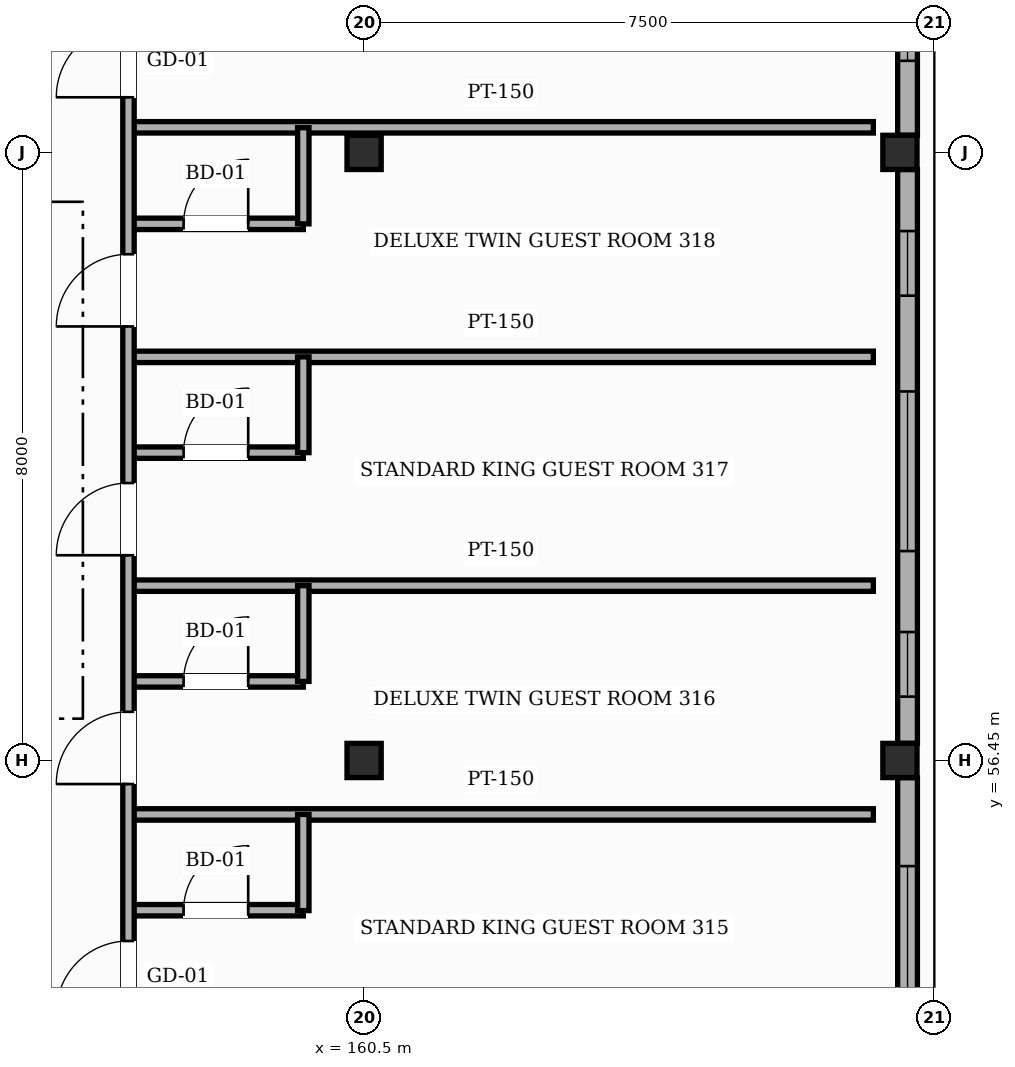
"""IFC4 building model, lengths in metres.
Left out: names, types, materials, properties, quantities, classifications, styles, units other than length and angle.
Written with IfcOpenShell. Run it as: python <this file> out.ifc"""

import sys

from ifc_helpers import new_model, si_unit, direction, frame, frame_2d, origin, origin_2d, place, context, subcontext, project, spatial, rectangle, hollow_rectangle, extrude, element, fill, save


model = new_model("IFC4")
c1 = context("Model", 3, precision=1e-05, world=origin(), true_north=direction((0.0, 1.0)))
c2 = subcontext(c1, "Body", "Model", "MODEL_VIEW")
j1 = project(units=[si_unit("LENGTHUNIT", "METRE"), si_unit("PLANEANGLEUNIT", "RADIAN")], contexts=[c1])
p1 = place(None, origin())
s1 = spatial("IfcSite", under=j1, at=p1, CompositionType="ELEMENT")
p2 = place(p1, origin())
s2 = spatial("IfcBuilding", under=s1, at=p2, CompositionType="ELEMENT")
p3 = place(p2, frame((0.0, 0.0, 42.6)))
s3 = spatial("IfcBuildingStorey", under=s2, at=p3, CompositionType="ELEMENT", Elevation=42.6)
for number, where, z_axis, x_axis in (
    (1, (160.5, 56.45, 0.0), (0.0, 0.0, 1.0), (1.0, 0.0, 0.0)),
    (2, (160.5, 64.45, 0.0), (0.0, 0.0, 1.0), (1.0, 0.0, 0.0)),
    (3, (167.55, 56.45, 0.0), (0.0, 0.0, 1.0), (1.0, 0.0, 0.0)),
    (4, (167.55, 64.45, 0.0), (0.0, 0.0, 1.0), (1.0, 0.0, 0.0)),
):
    element("IfcColumn", number, at=place(p3, frame(where, z_axis=z_axis, x_axis=x_axis)), inside=s3, PredefinedType="COLUMN", context=c2, shape_type="SweptSolid", body=[
        extrude(hollow_rectangle(XDim=0.45, YDim=0.45, WallThickness=0.019, InnerFilletRadius=0.019, OuterFilletRadius=0.038, at=origin_2d()), origin(), (0.0, 0.0, 1.0), 3.6),
    ])
p4 = place(p3, frame((167.65, 56.225, 0.0), z_axis=(0.0, 0.0, 1.0), x_axis=(0.0, -1.0, 0.0)))
e5 = element("IfcWall", 5, at=p4, inside=s3, PredefinedType="SOLIDWALL", context=c2, shape_type="SweptSolid", body=[
    extrude(rectangle(XDim=7.55, YDim=0.26, at=frame_2d((3.775, 0.0))), origin(), (0.0, 0.0, 1.0), 2.755),
])
p5 = place(p4, frame((4.285, 0.0, 0.85)))
e6 = element("IfcOpeningElement", 6, at=p5, cuts=e5, PredefinedType="OPENING", context=c2, shape_type="SweptSolid", body=[
    extrude(rectangle(XDim=1.45, YDim=1.35, at=frame_2d((0.725, 0.675))), frame((0.0, 0.14, 0.0), z_axis=(0.0, -1.0, 0.0), x_axis=(1.0, 0.0, 0.0)), (0.0, 0.0, 1.0), 0.28),
])
p6 = place(p4, frame((1.165, 0.0, 0.85)))
e7 = element("IfcOpeningElement", 7, at=p6, cuts=e5, PredefinedType="OPENING", context=c2, shape_type="SweptSolid", body=[
    extrude(rectangle(XDim=1.65, YDim=1.35, at=frame_2d((0.825, 0.675))), frame((0.0, 0.14, 0.0), z_axis=(0.0, -1.0, 0.0), x_axis=(1.0, 0.0, 0.0)), (0.0, 0.0, 1.0), 0.28),
])
p7 = place(p3, frame((167.65, 64.225, 0.0), z_axis=(0.0, 0.0, 1.0), x_axis=(0.0, -1.0, 0.0)))
e8 = element("IfcWall", 8, at=p7, inside=s3, PredefinedType="SOLIDWALL", context=c2, shape_type="SweptSolid", body=[
    extrude(rectangle(XDim=7.55, YDim=0.26, at=frame_2d((3.775, 0.0))), origin(), (0.0, 0.0, 1.0), 2.755),
])
p8 = place(p7, frame((6.085, 0.0, 0.85)))
e9 = element("IfcOpeningElement", 9, at=p8, cuts=e8, PredefinedType="OPENING", context=c2, shape_type="SweptSolid", body=[
    extrude(rectangle(XDim=0.85, YDim=1.35, at=frame_2d((0.425, 0.675))), frame((0.0, 0.14, 0.0), z_axis=(0.0, -1.0, 0.0), x_axis=(1.0, 0.0, 0.0)), (0.0, 0.0, 1.0), 0.28),
])
p9 = place(p7, frame((2.92, 0.0, 0.85)))
e10 = element("IfcOpeningElement", 10, at=p9, cuts=e8, PredefinedType="OPENING", context=c2, shape_type="SweptSolid", body=[
    extrude(rectangle(XDim=2.1, YDim=1.35, at=frame_2d((1.05, 0.675))), frame((0.0, 0.14, 0.0), z_axis=(0.0, -1.0, 0.0), x_axis=(1.0, 0.0, 0.0)), (0.0, 0.0, 1.0), 0.28),
])
p10 = place(p7, frame((0.81, 0.0, 0.85)))
e11 = element("IfcOpeningElement", 11, at=p10, cuts=e8, PredefinedType="OPENING", context=c2, shape_type="SweptSolid", body=[
    extrude(rectangle(XDim=0.85, YDim=1.35, at=frame_2d((0.425, 0.675))), frame((0.0, 0.14, 0.0), z_axis=(0.0, -1.0, 0.0), x_axis=(1.0, 0.0, 0.0)), (0.0, 0.0, 1.0), 0.28),
])
p11 = place(p3, frame((167.65, 70.8, 0.0), z_axis=(0.0, 0.0, 1.0), x_axis=(0.0, -1.0, 0.0)))
e12 = element("IfcWall", 12, at=p11, inside=s3, PredefinedType="SOLIDWALL", context=c2, shape_type="SweptSolid", body=[
    extrude(rectangle(XDim=6.125, YDim=0.26, at=frame_2d((3.062, 0.0))), origin(), (0.0, 0.0, 1.0), 3.365),
])
p12 = place(p11, frame((3.895, 0.0, 0.85)))
e13 = element("IfcOpeningElement", 13, at=p12, cuts=e12, PredefinedType="OPENING", context=c2, shape_type="SweptSolid", body=[
    extrude(rectangle(XDim=1.25, YDim=1.95, at=frame_2d((0.625, 0.975))), frame((0.0, 0.14, 0.0), z_axis=(0.0, -1.0, 0.0), x_axis=(1.0, 0.0, 0.0)), (0.0, 0.0, 1.0), 0.28),
])
p13 = place(p11, frame((0.785, 0.0, 0.85)))
e14 = element("IfcOpeningElement", 14, at=p13, cuts=e12, PredefinedType="OPENING", context=c2, shape_type="SweptSolid", body=[
    extrude(rectangle(XDim=1.45, YDim=1.95, at=frame_2d((0.725, 0.975))), frame((0.0, 0.14, 0.0), z_axis=(0.0, -1.0, 0.0), x_axis=(1.0, 0.0, 0.0)), (0.0, 0.0, 1.0), 0.28),
])
p14 = place(p3, frame((157.4, 54.48, 0.0), z_axis=(0.0, 0.0, 1.0), x_axis=(1.0, 0.0, 0.0)))
e15 = element("IfcWall", 15, at=p14, inside=s3, PredefinedType="PARTITIONING", context=c2, shape_type="SweptSolid", body=[
    extrude(rectangle(XDim=2.3, YDim=0.15, at=frame_2d((1.15, 0.0))), origin(), (0.0, 0.0, 1.0), 3.365),
])
p15 = place(p14, frame((0.725, 0.0, 0.0)))
e16 = element("IfcOpeningElement", 16, at=p15, cuts=e15, PredefinedType="OPENING", context=c2, shape_type="SweptSolid", body=[
    extrude(rectangle(XDim=0.85, YDim=2.1, at=frame_2d((0.425, 1.05))), frame((0.0, 0.085, 0.0), z_axis=(0.0, -1.0, 0.0), x_axis=(1.0, 0.0, 0.0)), (0.0, 0.0, 1.0), 0.17),
])
p16 = place(p3, frame((157.4, 55.74, 0.0), z_axis=(0.0, 0.0, 1.0), x_axis=(1.0, 0.0, 0.0)))
e17 = element("IfcWall", 17, at=p16, inside=s3, PredefinedType="PARTITIONING", context=c2, shape_type="SweptSolid", body=[
    extrude(rectangle(XDim=9.8, YDim=0.15, at=frame_2d((4.9, 0.0))), origin(), (0.0, 0.0, 1.0), 3.365),
])
p17 = place(p3, frame((157.4, 57.49, 0.0), z_axis=(0.0, 0.0, 1.0), x_axis=(1.0, 0.0, 0.0)))
e18 = element("IfcWall", 18, at=p17, inside=s3, PredefinedType="PARTITIONING", context=c2, shape_type="SweptSolid", body=[
    extrude(rectangle(XDim=2.3, YDim=0.15, at=frame_2d((1.15, 0.0))), origin(), (0.0, 0.0, 1.0), 3.365),
])
p18 = place(p17, frame((0.725, 0.0, 0.0)))
e19 = element("IfcOpeningElement", 19, at=p18, cuts=e18, PredefinedType="OPENING", context=c2, shape_type="SweptSolid", body=[
    extrude(rectangle(XDim=0.85, YDim=2.1, at=frame_2d((0.425, 1.05))), frame((0.0, 0.085, 0.0), z_axis=(0.0, -1.0, 0.0), x_axis=(1.0, 0.0, 0.0)), (0.0, 0.0, 1.0), 0.17),
])
p19 = place(p3, frame((157.4, 58.75, 0.0), z_axis=(0.0, 0.0, 1.0), x_axis=(1.0, 0.0, 0.0)))
e20 = element("IfcWall", 20, at=p19, inside=s3, PredefinedType="PARTITIONING", context=c2, shape_type="SweptSolid", body=[
    extrude(rectangle(XDim=9.8, YDim=0.15, at=frame_2d((4.9, 0.0))), origin(), (0.0, 0.0, 1.0), 3.365),
])
p20 = place(p3, frame((157.4, 60.5, 0.0), z_axis=(0.0, 0.0, 1.0), x_axis=(1.0, 0.0, 0.0)))
e21 = element("IfcWall", 21, at=p20, inside=s3, PredefinedType="PARTITIONING", context=c2, shape_type="SweptSolid", body=[
    extrude(rectangle(XDim=2.3, YDim=0.15, at=frame_2d((1.15, 0.0))), origin(), (0.0, 0.0, 1.0), 3.005),
])
p21 = place(p20, frame((0.725, 0.0, 0.0)))
e22 = element("IfcOpeningElement", 22, at=p21, cuts=e21, PredefinedType="OPENING", context=c2, shape_type="SweptSolid", body=[
    extrude(rectangle(XDim=0.85, YDim=2.1, at=frame_2d((0.425, 1.05))), frame((0.0, 0.085, 0.0), z_axis=(0.0, -1.0, 0.0), x_axis=(1.0, 0.0, 0.0)), (0.0, 0.0, 1.0), 0.17),
])
p22 = place(p3, frame((157.4, 61.76, 0.0), z_axis=(0.0, 0.0, 1.0), x_axis=(1.0, 0.0, 0.0)))
e23 = element("IfcWall", 23, at=p22, inside=s3, PredefinedType="PARTITIONING", context=c2, shape_type="SweptSolid", body=[
    extrude(rectangle(XDim=9.8, YDim=0.15, at=frame_2d((4.9, 0.0))), origin(), (0.0, 0.0, 1.0), 3.365),
])
p23 = place(p3, frame((157.4, 63.51, 0.0), z_axis=(0.0, 0.0, 1.0), x_axis=(1.0, 0.0, 0.0)))
e24 = element("IfcWall", 24, at=p23, inside=s3, PredefinedType="PARTITIONING", context=c2, shape_type="SweptSolid", body=[
    extrude(rectangle(XDim=2.3, YDim=0.15, at=frame_2d((1.15, 0.0))), origin(), (0.0, 0.0, 1.0), 3.365),
])
p24 = place(p23, frame((0.725, 0.0, 0.0)))
e25 = element("IfcOpeningElement", 25, at=p24, cuts=e24, PredefinedType="OPENING", context=c2, shape_type="SweptSolid", body=[
    extrude(rectangle(XDim=0.85, YDim=2.1, at=frame_2d((0.425, 1.05))), frame((0.0, 0.085, 0.0), z_axis=(0.0, -1.0, 0.0), x_axis=(1.0, 0.0, 0.0)), (0.0, 0.0, 1.0), 0.17),
])
p25 = place(p3, frame((157.4, 64.78, 0.0), z_axis=(0.0, 0.0, 1.0), x_axis=(1.0, 0.0, 0.0)))
e26 = element("IfcWall", 26, at=p25, inside=s3, PredefinedType="PARTITIONING", context=c2, shape_type="SweptSolid", body=[
    extrude(rectangle(XDim=9.8, YDim=0.15, at=frame_2d((4.9, 0.0))), origin(), (0.0, 0.0, 1.0), 3.365),
])
p26 = place(p3, frame((157.4, 22.6, 0.0), z_axis=(0.0, 0.0, 1.0), x_axis=(0.0, 1.0, 0.0)))
e27 = element("IfcWall", 27, at=p26, inside=s3, PredefinedType="PARTITIONING", context=c2, shape_type="SweptSolid", body=[
    extrude(rectangle(XDim=48.2, YDim=0.15, at=frame_2d((24.1, 0.0))), origin(), (0.0, 0.0, 1.0), 3.365),
])
p27 = place(p26, frame((0.325, 0.0, 0.0)))
e28 = element("IfcOpeningElement", 28, at=p27, cuts=e27, PredefinedType="OPENING", context=c2, shape_type="SweptSolid", body=[
    extrude(rectangle(XDim=1.1, YDim=2.2, at=frame_2d((0.55, 1.1))), frame((0.0, 0.085, 0.0), z_axis=(0.0, -1.0, 0.0), x_axis=(1.0, 0.0, 0.0)), (0.0, 0.0, 1.0), 0.17),
])
p28 = place(p26, frame((3.41, 0.0, 0.0)))
e29 = element("IfcOpeningElement", 29, at=p28, cuts=e27, PredefinedType="OPENING", context=c2, shape_type="SweptSolid", body=[
    extrude(rectangle(XDim=0.95, YDim=2.15, at=frame_2d((0.475, 1.075))), frame((0.0, 0.085, 0.0), z_axis=(0.0, -1.0, 0.0), x_axis=(1.0, 0.0, 0.0)), (0.0, 0.0, 1.0), 0.17),
])
p29 = place(p26, frame((6.425, 0.0, 0.0)))
e30 = element("IfcOpeningElement", 30, at=p29, cuts=e27, PredefinedType="OPENING", context=c2, shape_type="SweptSolid", body=[
    extrude(rectangle(XDim=0.95, YDim=2.15, at=frame_2d((0.475, 1.075))), frame((0.0, 0.085, 0.0), z_axis=(0.0, -1.0, 0.0), x_axis=(1.0, 0.0, 0.0)), (0.0, 0.0, 1.0), 0.17),
])
p30 = place(p26, frame((9.44, 0.0, 0.0)))
e31 = element("IfcOpeningElement", 31, at=p30, cuts=e27, PredefinedType="OPENING", context=c2, shape_type="SweptSolid", body=[
    extrude(rectangle(XDim=0.95, YDim=2.15, at=frame_2d((0.475, 1.075))), frame((0.0, 0.085, 0.0), z_axis=(0.0, -1.0, 0.0), x_axis=(1.0, 0.0, 0.0)), (0.0, 0.0, 1.0), 0.17),
])
p31 = place(p26, frame((12.45, 0.0, 0.0)))
e32 = element("IfcOpeningElement", 32, at=p31, cuts=e27, PredefinedType="OPENING", context=c2, shape_type="SweptSolid", body=[
    extrude(rectangle(XDim=0.95, YDim=2.15, at=frame_2d((0.475, 1.075))), frame((0.0, 0.085, 0.0), z_axis=(0.0, -1.0, 0.0), x_axis=(1.0, 0.0, 0.0)), (0.0, 0.0, 1.0), 0.17),
])
p32 = place(p26, frame((15.46, 0.0, 0.0)))
e33 = element("IfcOpeningElement", 33, at=p32, cuts=e27, PredefinedType="OPENING", context=c2, shape_type="SweptSolid", body=[
    extrude(rectangle(XDim=0.95, YDim=2.15, at=frame_2d((0.475, 1.075))), frame((0.0, 0.085, 0.0), z_axis=(0.0, -1.0, 0.0), x_axis=(1.0, 0.0, 0.0)), (0.0, 0.0, 1.0), 0.17),
])
p33 = place(p26, frame((18.475, 0.0, 0.0)))
e34 = element("IfcOpeningElement", 34, at=p33, cuts=e27, PredefinedType="OPENING", context=c2, shape_type="SweptSolid", body=[
    extrude(rectangle(XDim=0.95, YDim=2.15, at=frame_2d((0.475, 1.075))), frame((0.0, 0.085, 0.0), z_axis=(0.0, -1.0, 0.0), x_axis=(1.0, 0.0, 0.0)), (0.0, 0.0, 1.0), 0.17),
])
p34 = place(p26, frame((21.49, 0.0, 0.0)))
e35 = element("IfcOpeningElement", 35, at=p34, cuts=e27, PredefinedType="OPENING", context=c2, shape_type="SweptSolid", body=[
    extrude(rectangle(XDim=0.95, YDim=2.15, at=frame_2d((0.475, 1.075))), frame((0.0, 0.085, 0.0), z_axis=(0.0, -1.0, 0.0), x_axis=(1.0, 0.0, 0.0)), (0.0, 0.0, 1.0), 0.17),
])
p35 = place(p26, frame((24.5, 0.0, 0.0)))
e36 = element("IfcOpeningElement", 36, at=p35, cuts=e27, PredefinedType="OPENING", context=c2, shape_type="SweptSolid", body=[
    extrude(rectangle(XDim=0.95, YDim=2.15, at=frame_2d((0.475, 1.075))), frame((0.0, 0.085, 0.0), z_axis=(0.0, -1.0, 0.0), x_axis=(1.0, 0.0, 0.0)), (0.0, 0.0, 1.0), 0.17),
])
p36 = place(p26, frame((27.51, 0.0, 0.0)))
e37 = element("IfcOpeningElement", 37, at=p36, cuts=e27, PredefinedType="OPENING", context=c2, shape_type="SweptSolid", body=[
    extrude(rectangle(XDim=0.95, YDim=2.15, at=frame_2d((0.475, 1.075))), frame((0.0, 0.085, 0.0), z_axis=(0.0, -1.0, 0.0), x_axis=(1.0, 0.0, 0.0)), (0.0, 0.0, 1.0), 0.17),
])
p37 = place(p26, frame((30.525, 0.0, 0.0)))
e38 = element("IfcOpeningElement", 38, at=p37, cuts=e27, PredefinedType="OPENING", context=c2, shape_type="SweptSolid", body=[
    extrude(rectangle(XDim=0.95, YDim=2.15, at=frame_2d((0.475, 1.075))), frame((0.0, 0.085, 0.0), z_axis=(0.0, -1.0, 0.0), x_axis=(1.0, 0.0, 0.0)), (0.0, 0.0, 1.0), 0.17),
])
p38 = place(p26, frame((33.54, 0.0, 0.0)))
e39 = element("IfcOpeningElement", 39, at=p38, cuts=e27, PredefinedType="OPENING", context=c2, shape_type="SweptSolid", body=[
    extrude(rectangle(XDim=0.95, YDim=2.15, at=frame_2d((0.475, 1.075))), frame((0.0, 0.085, 0.0), z_axis=(0.0, -1.0, 0.0), x_axis=(1.0, 0.0, 0.0)), (0.0, 0.0, 1.0), 0.17),
])
p39 = place(p26, frame((36.55, 0.0, 0.0)))
e40 = element("IfcOpeningElement", 40, at=p39, cuts=e27, PredefinedType="OPENING", context=c2, shape_type="SweptSolid", body=[
    extrude(rectangle(XDim=0.95, YDim=2.15, at=frame_2d((0.475, 1.075))), frame((0.0, 0.085, 0.0), z_axis=(0.0, -1.0, 0.0), x_axis=(1.0, 0.0, 0.0)), (0.0, 0.0, 1.0), 0.17),
])
p40 = place(p26, frame((39.56, 0.0, 0.0)))
e41 = element("IfcOpeningElement", 41, at=p40, cuts=e27, PredefinedType="OPENING", context=c2, shape_type="SweptSolid", body=[
    extrude(rectangle(XDim=0.95, YDim=2.15, at=frame_2d((0.475, 1.075))), frame((0.0, 0.085, 0.0), z_axis=(0.0, -1.0, 0.0), x_axis=(1.0, 0.0, 0.0)), (0.0, 0.0, 1.0), 0.17),
])
p41 = place(p26, frame((42.575, 0.0, 0.0)))
e42 = element("IfcOpeningElement", 42, at=p41, cuts=e27, PredefinedType="OPENING", context=c2, shape_type="SweptSolid", body=[
    extrude(rectangle(XDim=0.95, YDim=2.15, at=frame_2d((0.475, 1.075))), frame((0.0, 0.085, 0.0), z_axis=(0.0, -1.0, 0.0), x_axis=(1.0, 0.0, 0.0)), (0.0, 0.0, 1.0), 0.17),
])
p42 = place(p26, frame((45.585, 0.0, 0.0)))
e43 = element("IfcOpeningElement", 43, at=p42, cuts=e27, PredefinedType="OPENING", context=c2, shape_type="SweptSolid", body=[
    extrude(rectangle(XDim=0.95, YDim=2.15, at=frame_2d((0.475, 1.075))), frame((0.0, 0.085, 0.0), z_axis=(0.0, -1.0, 0.0), x_axis=(1.0, 0.0, 0.0)), (0.0, 0.0, 1.0), 0.17),
])
p43 = place(p3, frame((159.7, 54.475, 0.0), z_axis=(0.0, 0.0, 1.0), x_axis=(0.0, 1.0, 0.0)))
e44 = element("IfcWall", 44, at=p43, inside=s3, PredefinedType="PARTITIONING", context=c2, shape_type="SweptSolid", body=[
    extrude(rectangle(XDim=1.265, YDim=0.15, at=frame_2d((0.632, 0.0))), origin(), (0.0, 0.0, 1.0), 3.365),
])
for number, where, z_axis, x_axis in (
    (45, (159.7, 57.49, 0.0), (0.0, 0.0, 1.0), (0.0, 1.0, 0.0)),
    (46, (159.7, 60.5, 0.0), (0.0, 0.0, 1.0), (0.0, 1.0, 0.0)),
):
    element("IfcWall", number, at=place(p3, frame(where, z_axis=z_axis, x_axis=x_axis)), inside=s3, PredefinedType="PARTITIONING", context=c2, shape_type="SweptSolid", body=[
        extrude(rectangle(XDim=1.26, YDim=0.15, at=frame_2d((0.63, 0.0))), origin(), (0.0, 0.0, 1.0), 3.365),
    ])
p44 = place(p3, frame((159.7, 63.51, 0.0), z_axis=(0.0, 0.0, 1.0), x_axis=(0.0, 1.0, 0.0)))
e47 = element("IfcWall", 47, at=p44, inside=s3, PredefinedType="PARTITIONING", context=c2, shape_type="SweptSolid", body=[
    extrude(rectangle(XDim=1.265, YDim=0.15, at=frame_2d((0.632, 0.0))), origin(), (0.0, 0.0, 1.0), 3.365),
])
p45 = place(p6, origin())
e48 = element("IfcWindow", 48, at=p45, inside=s3, PartitioningType="SINGLE_PANEL", PredefinedType="WINDOW", context=c2, shape_type="SweptSolid", body=[
    extrude(rectangle(XDim=1.65, YDim=1.35, at=frame_2d((0.825, 0.675))), frame((0.0, 0.03, 0.0), z_axis=(0.0, -1.0, 0.0), x_axis=(1.0, 0.0, 0.0)), (0.0, 0.0, 1.0), 0.06),
])
fill(e7, e48)
p46 = place(p8, origin())
e49 = element("IfcWindow", 49, at=p46, inside=s3, PartitioningType="SINGLE_PANEL", PredefinedType="WINDOW", context=c2, shape_type="SweptSolid", body=[
    extrude(rectangle(XDim=0.85, YDim=1.35, at=frame_2d((0.425, 0.675))), frame((0.0, 0.03, 0.0), z_axis=(0.0, -1.0, 0.0), x_axis=(1.0, 0.0, 0.0)), (0.0, 0.0, 1.0), 0.06),
])
fill(e9, e49)
p47 = place(p9, origin())
e50 = element("IfcWindow", 50, at=p47, inside=s3, PartitioningType="SINGLE_PANEL", PredefinedType="WINDOW", context=c2, shape_type="SweptSolid", body=[
    extrude(rectangle(XDim=2.1, YDim=1.35, at=frame_2d((1.05, 0.675))), frame((0.0, 0.03, 0.0), z_axis=(0.0, -1.0, 0.0), x_axis=(1.0, 0.0, 0.0)), (0.0, 0.0, 1.0), 0.06),
])
fill(e10, e50)
p48 = place(p10, origin())
e51 = element("IfcWindow", 51, at=p48, inside=s3, PartitioningType="SINGLE_PANEL", PredefinedType="WINDOW", context=c2, shape_type="SweptSolid", body=[
    extrude(rectangle(XDim=0.85, YDim=1.35, at=frame_2d((0.425, 0.675))), frame((0.0, 0.03, 0.0), z_axis=(0.0, -1.0, 0.0), x_axis=(1.0, 0.0, 0.0)), (0.0, 0.0, 1.0), 0.06),
])
fill(e11, e51)
p49 = place(p12, origin())
e52 = element("IfcWindow", 52, at=p49, inside=s3, PartitioningType="SINGLE_PANEL", PredefinedType="WINDOW", context=c2, shape_type="SweptSolid", body=[
    extrude(rectangle(XDim=1.25, YDim=1.95, at=frame_2d((0.625, 0.975))), frame((0.0, 0.03, 0.0), z_axis=(0.0, -1.0, 0.0), x_axis=(1.0, 0.0, 0.0)), (0.0, 0.0, 1.0), 0.06),
])
fill(e13, e52)
p50 = place(p37, origin())
e53 = element("IfcDoor", 53, at=p50, inside=s3, OperationType="SINGLE_SWING_LEFT", PredefinedType="DOOR", context=c2, shape_type="SweptSolid", body=[
    extrude(rectangle(XDim=0.95, YDim=2.15, at=frame_2d((0.475, 1.075))), frame((0.0, 0.025, 0.0), z_axis=(0.0, -1.0, 0.0), x_axis=(1.0, 0.0, 0.0)), (0.0, 0.0, 1.0), 0.05),
])
fill(e38, e53)
p51 = place(p15, origin())
e54 = element("IfcDoor", 54, at=p51, inside=s3, OperationType="SINGLE_SWING_RIGHT", PredefinedType="DOOR", context=c2, shape_type="SweptSolid", body=[
    extrude(rectangle(XDim=0.85, YDim=2.1, at=frame_2d((0.425, 1.05))), frame((0.0, 0.025, 0.0), z_axis=(0.0, -1.0, 0.0), x_axis=(1.0, 0.0, 0.0)), (0.0, 0.0, 1.0), 0.05),
])
fill(e16, e54)
p52 = place(p38, origin())
e55 = element("IfcDoor", 55, at=p52, inside=s3, OperationType="SINGLE_SWING_LEFT", PredefinedType="DOOR", context=c2, shape_type="SweptSolid", body=[
    extrude(rectangle(XDim=0.95, YDim=2.15, at=frame_2d((0.475, 1.075))), frame((0.0, 0.025, 0.0), z_axis=(0.0, -1.0, 0.0), x_axis=(1.0, 0.0, 0.0)), (0.0, 0.0, 1.0), 0.05),
])
fill(e39, e55)
p53 = place(p18, origin())
e56 = element("IfcDoor", 56, at=p53, inside=s3, OperationType="SINGLE_SWING_RIGHT", PredefinedType="DOOR", context=c2, shape_type="SweptSolid", body=[
    extrude(rectangle(XDim=0.85, YDim=2.1, at=frame_2d((0.425, 1.05))), frame((0.0, 0.025, 0.0), z_axis=(0.0, -1.0, 0.0), x_axis=(1.0, 0.0, 0.0)), (0.0, 0.0, 1.0), 0.05),
])
fill(e19, e56)
p54 = place(p39, origin())
e57 = element("IfcDoor", 57, at=p54, inside=s3, OperationType="SINGLE_SWING_LEFT", PredefinedType="DOOR", context=c2, shape_type="SweptSolid", body=[
    extrude(rectangle(XDim=0.95, YDim=2.15, at=frame_2d((0.475, 1.075))), frame((0.0, 0.025, 0.0), z_axis=(0.0, -1.0, 0.0), x_axis=(1.0, 0.0, 0.0)), (0.0, 0.0, 1.0), 0.05),
])
fill(e40, e57)
p55 = place(p21, origin())
e58 = element("IfcDoor", 58, at=p55, inside=s3, OperationType="SINGLE_SWING_RIGHT", PredefinedType="DOOR", context=c2, shape_type="SweptSolid", body=[
    extrude(rectangle(XDim=0.85, YDim=2.1, at=frame_2d((0.425, 1.05))), frame((0.0, 0.025, 0.0), z_axis=(0.0, -1.0, 0.0), x_axis=(1.0, 0.0, 0.0)), (0.0, 0.0, 1.0), 0.05),
])
fill(e22, e58)
p56 = place(p40, origin())
e59 = element("IfcDoor", 59, at=p56, inside=s3, OperationType="SINGLE_SWING_LEFT", PredefinedType="DOOR", context=c2, shape_type="SweptSolid", body=[
    extrude(rectangle(XDim=0.95, YDim=2.15, at=frame_2d((0.475, 1.075))), frame((0.0, 0.025, 0.0), z_axis=(0.0, -1.0, 0.0), x_axis=(1.0, 0.0, 0.0)), (0.0, 0.0, 1.0), 0.05),
])
fill(e41, e59)
p57 = place(p24, origin())
e60 = element("IfcDoor", 60, at=p57, inside=s3, OperationType="SINGLE_SWING_RIGHT", PredefinedType="DOOR", context=c2, shape_type="SweptSolid", body=[
    extrude(rectangle(XDim=0.85, YDim=2.1, at=frame_2d((0.425, 1.05))), frame((0.0, 0.025, 0.0), z_axis=(0.0, -1.0, 0.0), x_axis=(1.0, 0.0, 0.0)), (0.0, 0.0, 1.0), 0.05),
])
fill(e25, e60)
p58 = place(p41, origin())
e61 = element("IfcDoor", 61, at=p58, inside=s3, OperationType="SINGLE_SWING_LEFT", PredefinedType="DOOR", context=c2, shape_type="SweptSolid", body=[
    extrude(rectangle(XDim=0.95, YDim=2.15, at=frame_2d((0.475, 1.075))), frame((0.0, 0.025, 0.0), z_axis=(0.0, -1.0, 0.0), x_axis=(1.0, 0.0, 0.0)), (0.0, 0.0, 1.0), 0.05),
])
fill(e42, e61)
save(model, sys.argv[1])
